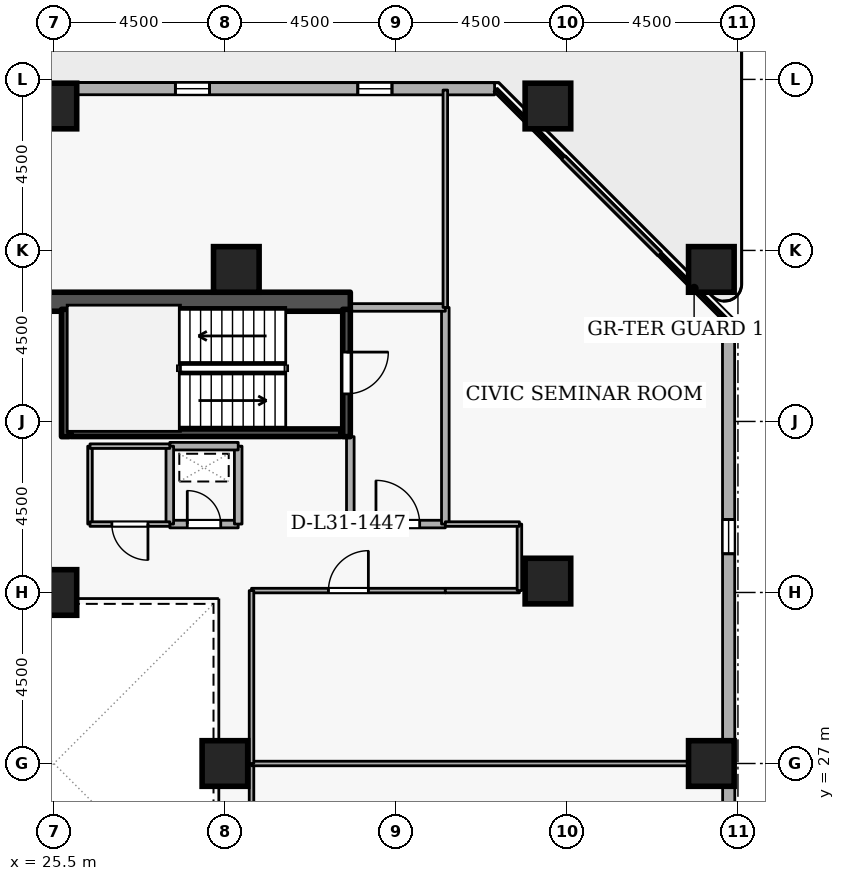
"""IFC4 building model, lengths in metres.
Left out: names, types, materials, properties, quantities, classifications, styles, units other than length and angle.
Written with IfcOpenShell. Run it as: python <this file> out.ifc"""

import sys

from ifc_helpers import new_model, si_unit, direction, frame, frame_2d, origin, origin_2d, place, context, subcontext, project, spatial, rectangle, extrude, element, fill, save


model = new_model("IFC4")
c1 = context("Model", 3, precision=1e-05, world=origin(), true_north=direction((0.0, 1.0)))
c2 = subcontext(c1, "Body", "Model", "MODEL_VIEW")
j1 = project(units=[si_unit("LENGTHUNIT", "METRE"), si_unit("PLANEANGLEUNIT", "RADIAN")], contexts=[c1])
p1 = place(None, origin())
s1 = spatial("IfcSite", under=j1, at=p1, CompositionType="ELEMENT")
p2 = place(p1, origin())
s2 = spatial("IfcBuilding", under=s1, at=p2, CompositionType="ELEMENT")
p3 = place(p2, frame((0.0, 0.0, 119.7)))
s3 = spatial("IfcBuildingStorey", under=s2, at=p3, CompositionType="ELEMENT", Elevation=119.7)
p4 = place(p3, frame((17.7, 39.15, 0.0), z_axis=(0.0, 0.0, 1.0), x_axis=(1.0, 0.0, 0.0)))
e1 = element("IfcWall", 1, at=p4, inside=s3, PredefinedType="SHEAR", context=c2, shape_type="SweptSolid", body=[
    extrude(rectangle(XDim=15.6, YDim=0.5, at=frame_2d((7.8, 0.0))), origin(), (0.0, 0.0, 1.0), 3.6),
])
for number, where, z_axis, x_axis in (
    (2, (42.8, 27.0, 0.0), (0.0, 0.0, 1.0), (1.0, 0.0, 0.0)),
    (3, (42.8, 40.0, 0.0), (0.0, 0.0, 1.0), (1.0, 0.0, 0.0)),
    (4, (25.5, 44.3, 0.0), (0.0, 0.0, 1.0), (1.0, 0.0, 0.0)),
    (5, (38.5, 44.3, 0.0), (0.0, 0.0, 1.0), (1.0, 0.0, 0.0)),
    (6, (38.5, 31.8, 0.0), (0.0, 0.0, 1.0), (1.0, 0.0, 0.0)),
    (7, (30.3, 40.0, 0.0), (0.0, 0.0, 1.0), (1.0, 0.0, 0.0)),
    (8, (25.5, 31.5, 0.0), (0.0, 0.0, 1.0), (1.0, 0.0, 0.0)),
    (9, (30.0, 27.0, 0.0), (0.0, 0.0, 1.0), (1.0, 0.0, 0.0)),
):
    element("IfcColumn", number, at=place(p3, frame(where, z_axis=z_axis, x_axis=x_axis)), inside=s3, PredefinedType="COLUMN", context=c2, shape_type="SweptSolid", body=[
        extrude(rectangle(XDim=1.2, YDim=1.2, at=origin_2d()), origin(), (0.0, 0.0, 1.0), 3.6),
    ])
p5 = place(p3, frame((43.265, 5.819, 0.0), z_axis=(0.0, 0.0, 1.0), x_axis=(-0.000364968916, 0.999999933399, 0.0)))
e10 = element("IfcWall", 10, at=p5, inside=s3, PredefinedType="STANDARD", context=c2, shape_type="SweptSolid", body=[
    extrude(rectangle(XDim=32.778, YDim=0.32, at=frame_2d((16.389, 0.0))), origin(), (0.0, 0.0, 1.0), 2.7),
])
p6 = place(p5, frame((2.7, 0.0, 0.72)))
e11 = element("IfcOpeningElement", 11, at=p6, cuts=e10, PredefinedType="OPENING", context=c2, shape_type="SweptSolid", body=[
    extrude(rectangle(XDim=0.9, YDim=1.75, at=frame_2d((0.45, 0.875))), frame((0.0, 0.17, 0.0), z_axis=(0.0, -1.0, 0.0), x_axis=(1.0, 0.0, 0.0)), (0.0, 0.0, 1.0), 0.34),
])
p7 = place(p5, frame((12.3, 0.0, 0.72)))
e12 = element("IfcOpeningElement", 12, at=p7, cuts=e10, PredefinedType="OPENING", context=c2, shape_type="SweptSolid", body=[
    extrude(rectangle(XDim=0.9, YDim=1.75, at=frame_2d((0.45, 0.875))), frame((0.0, 0.17, 0.0), z_axis=(0.0, -1.0, 0.0), x_axis=(1.0, 0.0, 0.0)), (0.0, 0.0, 1.0), 0.34),
])
p8 = place(p5, frame((17.1, 0.0, 0.72)))
e13 = element("IfcOpeningElement", 13, at=p8, cuts=e10, PredefinedType="OPENING", context=c2, shape_type="SweptSolid", body=[
    extrude(rectangle(XDim=0.9, YDim=1.75, at=frame_2d((0.45, 0.875))), frame((0.0, 0.17, 0.0), z_axis=(0.0, -1.0, 0.0), x_axis=(1.0, 0.0, 0.0)), (0.0, 0.0, 1.0), 0.34),
])
p9 = place(p5, frame((26.7, 0.0, 0.72)))
e14 = element("IfcOpeningElement", 14, at=p9, cuts=e10, PredefinedType="OPENING", context=c2, shape_type="SweptSolid", body=[
    extrude(rectangle(XDim=0.9, YDim=1.75, at=frame_2d((0.45, 0.875))), frame((0.0, 0.17, 0.0), z_axis=(0.0, -1.0, 0.0), x_axis=(1.0, 0.0, 0.0)), (0.0, 0.0, 1.0), 0.34),
])
p10 = place(p3, frame((37.096, 44.753, 0.0), z_axis=(0.0, 0.0, 1.0), x_axis=(-0.999999933399, 0.000364968916, 0.0)))
e15 = element("IfcWall", 15, at=p10, inside=s3, PredefinedType="STANDARD", context=c2, shape_type="SweptSolid", body=[
    extrude(rectangle(XDim=32.778, YDim=0.32, at=frame_2d((16.389, 0.0))), origin(), (0.0, 0.0, 1.0), 2.7),
])
p11 = place(p10, frame((26.664, 0.0, 0.0)))
e16 = element("IfcOpeningElement", 16, at=p11, cuts=e15, PredefinedType="OPENING", context=c2, shape_type="SweptSolid", body=[
    extrude(rectangle(XDim=1.15, YDim=2.1, at=frame_2d((0.575, 1.05))), frame((0.0, 0.17, 0.0), z_axis=(0.0, -1.0, 0.0), x_axis=(1.0, 0.0, 0.0)), (0.0, 0.0, 1.0), 0.34),
])
p12 = place(p10, frame((2.7, 0.0, 0.72)))
e17 = element("IfcOpeningElement", 17, at=p12, cuts=e15, PredefinedType="OPENING", context=c2, shape_type="SweptSolid", body=[
    extrude(rectangle(XDim=0.9, YDim=1.75, at=frame_2d((0.45, 0.875))), frame((0.0, 0.17, 0.0), z_axis=(0.0, -1.0, 0.0), x_axis=(1.0, 0.0, 0.0)), (0.0, 0.0, 1.0), 0.34),
])
p13 = place(p10, frame((7.5, 0.0, 0.72)))
e18 = element("IfcOpeningElement", 18, at=p13, cuts=e15, PredefinedType="OPENING", context=c2, shape_type="SweptSolid", body=[
    extrude(rectangle(XDim=0.9, YDim=1.75, at=frame_2d((0.45, 0.875))), frame((0.0, 0.17, 0.0), z_axis=(0.0, -1.0, 0.0), x_axis=(1.0, 0.0, 0.0)), (0.0, 0.0, 1.0), 0.34),
])
p14 = place(p10, frame((17.1, 0.0, 0.72)))
e19 = element("IfcOpeningElement", 19, at=p14, cuts=e15, PredefinedType="OPENING", context=c2, shape_type="SweptSolid", body=[
    extrude(rectangle(XDim=0.9, YDim=1.75, at=frame_2d((0.45, 0.875))), frame((0.0, 0.17, 0.0), z_axis=(0.0, -1.0, 0.0), x_axis=(1.0, 0.0, 0.0)), (0.0, 0.0, 1.0), 0.34),
])
p15 = place(p10, frame((21.9, 0.0, 0.72)))
e20 = element("IfcOpeningElement", 20, at=p15, cuts=e15, PredefinedType="OPENING", context=c2, shape_type="SweptSolid", body=[
    extrude(rectangle(XDim=0.9, YDim=1.75, at=frame_2d((0.45, 0.875))), frame((0.0, 0.17, 0.0), z_axis=(0.0, -1.0, 0.0), x_axis=(1.0, 0.0, 0.0)), (0.0, 0.0, 1.0), 0.34),
])
p16 = place(p3, frame((33.2, 38.95, 0.0), z_axis=(0.0, 0.0, 1.0), x_axis=(0.0, -1.0, 0.0)))
e21 = element("IfcWall", 21, at=p16, inside=s3, PredefinedType="SHEAR", context=c2, shape_type="SweptSolid", body=[
    extrude(rectangle(XDim=3.35, YDim=0.2, at=frame_2d((1.675, 0.0))), origin(), (0.0, 0.0, 1.0), 3.6),
])
p17 = place(p16, frame((1.125, 0.0, 0.0)))
e22 = element("IfcOpeningElement", 22, at=p17, cuts=e21, PredefinedType="OPENING", context=c2, shape_type="SweptSolid", body=[
    extrude(rectangle(XDim=1.1, YDim=2.1, at=frame_2d((0.55, 1.05))), frame((0.0, 0.11, 0.0), z_axis=(0.0, -1.0, 0.0), x_axis=(1.0, 0.0, 0.0)), (0.0, 0.0, 1.0), 0.22),
])
p18 = place(p3, frame((25.8, 35.6, 0.0), z_axis=(0.0, 0.0, 1.0), x_axis=(0.0, 1.0, 0.0)))
e23 = element("IfcWall", 23, at=p18, inside=s3, PredefinedType="SHEAR", context=c2, shape_type="SweptSolid", body=[
    extrude(rectangle(XDim=3.35, YDim=0.2, at=frame_2d((1.675, 0.0))), origin(), (0.0, 0.0, 1.0), 3.6),
])
p19 = place(p3, frame((25.95, 35.703, 0.0), z_axis=(0.0, 0.0, 1.0), x_axis=(1.0, 0.0, 0.0)))
e24 = element("IfcWall", 24, at=p19, inside=s3, PredefinedType="SHEAR", context=c2, shape_type="SweptSolid", body=[
    extrude(rectangle(XDim=7.1, YDim=0.2, at=frame_2d((3.55, 0.0))), origin(), (0.0, 0.0, 1.0), 3.6),
])
p20 = place(p3, frame((33.3, 33.3, 0.0), z_axis=(0.0, 0.0, 1.0), x_axis=(1.0, 0.0, 0.0)))
e25 = element("IfcWall", 25, at=p20, inside=s3, PredefinedType="STANDARD", context=c2, shape_type="SweptSolid", body=[
    extrude(rectangle(XDim=2.5, YDim=0.2, at=frame_2d((1.25, 0.0))), origin(), (0.0, 0.0, 1.0), 3.32),
])
p21 = place(p20, frame((0.675, 0.0, 0.0)))
e26 = element("IfcOpeningElement", 26, at=p21, cuts=e25, PredefinedType="OPENING", context=c2, shape_type="SweptSolid", body=[
    extrude(rectangle(XDim=1.15, YDim=2.1, at=frame_2d((0.575, 1.05))), frame((0.0, 0.11, 0.0), z_axis=(0.0, -1.0, 0.0), x_axis=(1.0, 0.0, 0.0)), (0.0, 0.0, 1.0), 0.22),
])
p22 = place(p3, frame((35.8, 33.3, 0.0), z_axis=(0.0, 0.0, 1.0), x_axis=(0.0, 1.0, 0.0)))
e27 = element("IfcWall", 27, at=p22, inside=s3, PredefinedType="STANDARD", context=c2, shape_type="SweptSolid", body=[
    extrude(rectangle(XDim=5.7, YDim=0.2, at=frame_2d((2.85, 0.0))), origin(), (0.0, 0.0, 1.0), 3.32),
])
p23 = place(p3, frame((35.8, 39.0, 0.0), z_axis=(0.0, 0.0, 1.0), x_axis=(-1.0, 0.0, 0.0)))
e28 = element("IfcWall", 28, at=p23, inside=s3, PredefinedType="STANDARD", context=c2, shape_type="SweptSolid", body=[
    extrude(rectangle(XDim=2.5, YDim=0.2, at=frame_2d((1.25, 0.0))), origin(), (0.0, 0.0, 1.0), 3.32),
])
p24 = place(p3, frame((33.3, 35.6, 0.0), z_axis=(0.0, 0.0, 1.0), x_axis=(0.0, -1.0, 0.0)))
e29 = element("IfcWall", 29, at=p24, inside=s3, PredefinedType="STANDARD", context=c2, shape_type="SweptSolid", body=[
    extrude(rectangle(XDim=2.3, YDim=0.2, at=frame_2d((1.15, 0.0))), origin(), (0.0, 0.0, 1.0), 2.525),
])
p25 = place(p3, frame((28.55, 33.3, 0.0), z_axis=(0.0, 0.0, 1.0), x_axis=(1.0, 0.0, 0.0)))
e30 = element("IfcWall", 30, at=p25, inside=s3, PredefinedType="STANDARD", context=c2, shape_type="SweptSolid", body=[
    extrude(rectangle(XDim=1.8, YDim=0.2, at=frame_2d((0.9, 0.0))), origin(), (0.0, 0.0, 1.0), 3.32),
])
p26 = place(p25, frame((0.46, 0.0, 0.0)))
e31 = element("IfcOpeningElement", 31, at=p26, cuts=e30, PredefinedType="OPENING", context=c2, shape_type="SweptSolid", body=[
    extrude(rectangle(XDim=0.88, YDim=2.04, at=frame_2d((0.44, 1.02))), frame((0.0, 0.11, 0.0), z_axis=(0.0, -1.0, 0.0), x_axis=(1.0, 0.0, 0.0)), (0.0, 0.0, 1.0), 0.22),
])
p27 = place(p3, frame((30.35, 33.3, 0.0), z_axis=(0.0, 0.0, 1.0), x_axis=(0.0, 1.0, 0.0)))
e32 = element("IfcWall", 32, at=p27, inside=s3, PredefinedType="STANDARD", context=c2, shape_type="SweptSolid", body=[
    extrude(rectangle(XDim=2.05, YDim=0.2, at=frame_2d((1.025, 0.0))), origin(), (0.0, 0.0, 1.0), 3.32),
])
p28 = place(p3, frame((30.35, 35.35, 0.0), z_axis=(0.0, 0.0, 1.0), x_axis=(-1.0, 0.0, 0.0)))
e33 = element("IfcWall", 33, at=p28, inside=s3, PredefinedType="STANDARD", context=c2, shape_type="SweptSolid", body=[
    extrude(rectangle(XDim=1.8, YDim=0.2, at=frame_2d((0.9, 0.0))), origin(), (0.0, 0.0, 1.0), 3.32),
])
p29 = place(p3, frame((28.55, 35.35, 0.0), z_axis=(0.0, 0.0, 1.0), x_axis=(0.0, -1.0, 0.0)))
e34 = element("IfcWall", 34, at=p29, inside=s3, PredefinedType="STANDARD", context=c2, shape_type="SweptSolid", body=[
    extrude(rectangle(XDim=2.05, YDim=0.2, at=frame_2d((1.025, 0.0))), origin(), (0.0, 0.0, 1.0), 3.32),
])
p30 = place(p3, frame((26.45, 33.3, 0.0), z_axis=(0.0, 0.0, 1.0), x_axis=(0.0, 1.0, 0.0)))
e35 = element("IfcWall", 35, at=p30, inside=s3, PredefinedType="PARTITIONING", context=c2, shape_type="SweptSolid", body=[
    extrude(rectangle(XDim=2.05, YDim=0.12, at=frame_2d((1.025, 0.0))), origin(), (0.0, 0.0, 1.0), 3.32),
])
p31 = place(p3, frame((26.45, 35.35, 0.0), z_axis=(0.0, 0.0, 1.0), x_axis=(1.0, 0.0, 0.0)))
e36 = element("IfcWall", 36, at=p31, inside=s3, PredefinedType="PARTITIONING", context=c2, shape_type="SweptSolid", body=[
    extrude(rectangle(XDim=2.1, YDim=0.12, at=frame_2d((1.05, 0.0))), origin(), (0.0, 0.0, 1.0), 3.32),
])
p32 = place(p3, frame((28.55, 33.3, 0.0), z_axis=(0.0, 0.0, 1.0), x_axis=(-1.0, 0.0, 0.0)))
e37 = element("IfcWall", 37, at=p32, inside=s3, PredefinedType="PARTITIONING", context=c2, shape_type="SweptSolid", body=[
    extrude(rectangle(XDim=2.1, YDim=0.12, at=frame_2d((1.05, 0.0))), origin(), (0.0, 0.0, 1.0), 3.32),
])
p33 = place(p32, frame((0.575, 0.0, 0.0)))
e38 = element("IfcOpeningElement", 38, at=p33, cuts=e37, PredefinedType="OPENING", context=c2, shape_type="SweptSolid", body=[
    extrude(rectangle(XDim=0.95, YDim=2.1, at=frame_2d((0.475, 1.05))), frame((0.0, 0.07, 0.0), z_axis=(0.0, -1.0, 0.0), x_axis=(1.0, 0.0, 0.0)), (0.0, 0.0, 1.0), 0.14),
])
p34 = place(p3, frame((30.7, 22.45, 0.0), z_axis=(0.0, 0.0, 1.0), x_axis=(0.0, 1.0, 0.0)))
e39 = element("IfcWall", 39, at=p34, inside=s3, PredefinedType="PARTITIONING", context=c2, shape_type="SweptSolid", body=[
    extrude(rectangle(XDim=4.55, YDim=0.12, at=frame_2d((2.275, 0.0))), origin(), (0.0, 0.0, 1.0), 3.32),
])
p35 = place(p3, frame((30.7, 27.0, 0.0), z_axis=(0.0, 0.0, 1.0), x_axis=(1.0, 0.0, 0.0)))
e40 = element("IfcWall", 40, at=p35, inside=s3, PredefinedType="PARTITIONING", context=c2, shape_type="SweptSolid", body=[
    extrude(rectangle(XDim=12.52, YDim=0.12, at=frame_2d((6.26, 0.0))), origin(), (0.0, 0.0, 1.0), 2.912),
])
p36 = place(p3, frame((30.7, 31.55, 0.0), z_axis=(0.0, 0.0, 1.0), x_axis=(1.0, 0.0, 0.0)))
e41 = element("IfcWall", 41, at=p36, inside=s3, PredefinedType="PARTITIONING", context=c2, shape_type="SweptSolid", body=[
    extrude(rectangle(XDim=5.1, YDim=0.12, at=frame_2d((2.55, 0.0))), origin(), (0.0, 0.0, 1.0), 3.32),
])
p37 = place(p36, frame((2.025, 0.0, 0.0)))
e42 = element("IfcOpeningElement", 42, at=p37, cuts=e41, PredefinedType="OPENING", context=c2, shape_type="SweptSolid", body=[
    extrude(rectangle(XDim=1.05, YDim=2.1, at=frame_2d((0.525, 1.05))), frame((0.0, 0.07, 0.0), z_axis=(0.0, -1.0, 0.0), x_axis=(1.0, 0.0, 0.0)), (0.0, 0.0, 1.0), 0.14),
])
p38 = place(p3, frame((35.8, 31.55, 0.0), z_axis=(0.0, 0.0, 1.0), x_axis=(1.0, 0.0, 0.0)))
e43 = element("IfcWall", 43, at=p38, inside=s3, PredefinedType="PARTITIONING", context=c2, shape_type="SweptSolid", body=[
    extrude(rectangle(XDim=1.95, YDim=0.12, at=frame_2d((0.975, 0.0))), origin(), (0.0, 0.0, 1.0), 3.32),
])
p39 = place(p3, frame((37.75, 31.55, 0.0), z_axis=(0.0, 0.0, 1.0), x_axis=(0.0, 1.0, 0.0)))
e44 = element("IfcWall", 44, at=p39, inside=s3, PredefinedType="PARTITIONING", context=c2, shape_type="SweptSolid", body=[
    extrude(rectangle(XDim=1.75, YDim=0.12, at=frame_2d((0.875, 0.0))), origin(), (0.0, 0.0, 1.0), 3.32),
])
p40 = place(p3, frame((37.75, 33.3, 0.0), z_axis=(0.0, 0.0, 1.0), x_axis=(-1.0, 0.0, 0.0)))
e45 = element("IfcWall", 45, at=p40, inside=s3, PredefinedType="PARTITIONING", context=c2, shape_type="SweptSolid", body=[
    extrude(rectangle(XDim=1.95, YDim=0.12, at=frame_2d((0.975, 0.0))), origin(), (0.0, 0.0, 1.0), 3.32),
])
p41 = place(p3, frame((35.8, 39.0, 0.0), z_axis=(0.0, 0.0, 1.0), x_axis=(0.0, 1.0, 0.0)))
e46 = element("IfcWall", 46, at=p41, inside=s3, PredefinedType="PARTITIONING", context=c2, shape_type="SweptSolid", body=[
    extrude(rectangle(XDim=5.72, YDim=0.12, at=frame_2d((2.86, 0.0))), origin(), (0.0, 0.0, 1.0), 3.32),
])
p42 = place(p3, frame((37.125, 44.72, 0.0), z_axis=(0.0, 0.0, 1.0), x_axis=(0.707106781187, -0.707106781187, 0.0)))
e47 = element("IfcWall", 47, at=p42, inside=s3, PredefinedType="PARTITIONING", context=c2, shape_type="SweptSolid", body=[
    extrude(rectangle(XDim=8.619, YDim=0.12, at=frame_2d((4.31, 0.0))), origin(), (0.0, 0.0, 1.0), 3.32),
])
p43 = place(p3, frame((30.7, 27.0, 0.0), z_axis=(0.0, 0.0, 1.0), x_axis=(0.0, 1.0, 0.0)))
e48 = element("IfcWall", 48, at=p43, inside=s3, PredefinedType="PARTITIONING", context=c2, shape_type="SweptSolid", body=[
    extrude(rectangle(XDim=4.55, YDim=0.12, at=frame_2d((2.275, 0.0))), origin(), (0.0, 0.0, 1.0), 3.32),
])
p44 = place(p9, origin())
e49 = element("IfcWindow", 49, at=p44, inside=s3, PartitioningType="SINGLE_PANEL", PredefinedType="WINDOW", context=c2, shape_type="SweptSolid", body=[
    extrude(rectangle(XDim=0.9, YDim=1.75, at=frame_2d((0.45, 0.875))), frame((0.0, 0.03, 0.0), z_axis=(0.0, -1.0, 0.0), x_axis=(1.0, 0.0, 0.0)), (0.0, 0.0, 1.0), 0.06),
])
fill(e14, e49)
p45 = place(p12, origin())
e50 = element("IfcWindow", 50, at=p45, inside=s3, PartitioningType="SINGLE_PANEL", PredefinedType="WINDOW", context=c2, shape_type="SweptSolid", body=[
    extrude(rectangle(XDim=0.9, YDim=1.75, at=frame_2d((0.45, 0.875))), frame((0.0, 0.03, 0.0), z_axis=(0.0, -1.0, 0.0), x_axis=(1.0, 0.0, 0.0)), (0.0, 0.0, 1.0), 0.06),
])
fill(e17, e50)
p46 = place(p13, origin())
e51 = element("IfcWindow", 51, at=p46, inside=s3, PartitioningType="SINGLE_PANEL", PredefinedType="WINDOW", context=c2, shape_type="SweptSolid", body=[
    extrude(rectangle(XDim=0.9, YDim=1.75, at=frame_2d((0.45, 0.875))), frame((0.0, 0.03, 0.0), z_axis=(0.0, -1.0, 0.0), x_axis=(1.0, 0.0, 0.0)), (0.0, 0.0, 1.0), 0.06),
])
fill(e18, e51)
p47 = place(p17, origin())
e52 = element("IfcDoor", 52, at=p47, inside=s3, OperationType="SINGLE_SWING_LEFT", PredefinedType="DOOR", context=c2, shape_type="SweptSolid", body=[
    extrude(rectangle(XDim=1.1, YDim=2.1, at=frame_2d((0.55, 1.05))), frame((0.0, 0.025, 0.0), z_axis=(0.0, -1.0, 0.0), x_axis=(1.0, 0.0, 0.0)), (0.0, 0.0, 1.0), 0.05),
])
fill(e22, e52)
p48 = place(p21, origin())
e53 = element("IfcDoor", 53, at=p48, inside=s3, OperationType="SINGLE_SWING_LEFT", PredefinedType="DOOR", context=c2, shape_type="SweptSolid", body=[
    extrude(rectangle(XDim=1.15, YDim=2.1, at=frame_2d((0.575, 1.05))), frame((0.0, 0.025, 0.0), z_axis=(0.0, -1.0, 0.0), x_axis=(1.0, 0.0, 0.0)), (0.0, 0.0, 1.0), 0.05),
])
fill(e26, e53)
p49 = place(p26, origin())
e54 = element("IfcDoor", 54, at=p49, inside=s3, OperationType="SINGLE_SWING_LEFT", PredefinedType="DOOR", context=c2, shape_type="SweptSolid", body=[
    extrude(rectangle(XDim=0.88, YDim=2.04, at=frame_2d((0.44, 1.02))), frame((0.0, 0.025, 0.0), z_axis=(0.0, -1.0, 0.0), x_axis=(1.0, 0.0, 0.0)), (0.0, 0.0, 1.0), 0.05),
])
fill(e31, e54)
p50 = place(p33, origin())
e55 = element("IfcDoor", 55, at=p50, inside=s3, OperationType="SINGLE_SWING_LEFT", PredefinedType="DOOR", context=c2, shape_type="SweptSolid", body=[
    extrude(rectangle(XDim=0.95, YDim=2.1, at=frame_2d((0.475, 1.05))), frame((0.0, 0.025, 0.0), z_axis=(0.0, -1.0, 0.0), x_axis=(1.0, 0.0, 0.0)), (0.0, 0.0, 1.0), 0.05),
])
fill(e38, e55)
p51 = place(p37, origin())
e56 = element("IfcDoor", 56, at=p51, inside=s3, OperationType="SINGLE_SWING_RIGHT", PredefinedType="DOOR", context=c2, shape_type="SweptSolid", body=[
    extrude(rectangle(XDim=1.05, YDim=2.1, at=frame_2d((0.525, 1.05))), frame((0.0, 0.025, 0.0), z_axis=(0.0, -1.0, 0.0), x_axis=(1.0, 0.0, 0.0)), (0.0, 0.0, 1.0), 0.05),
])
fill(e42, e56)
save(model, sys.argv[1])
